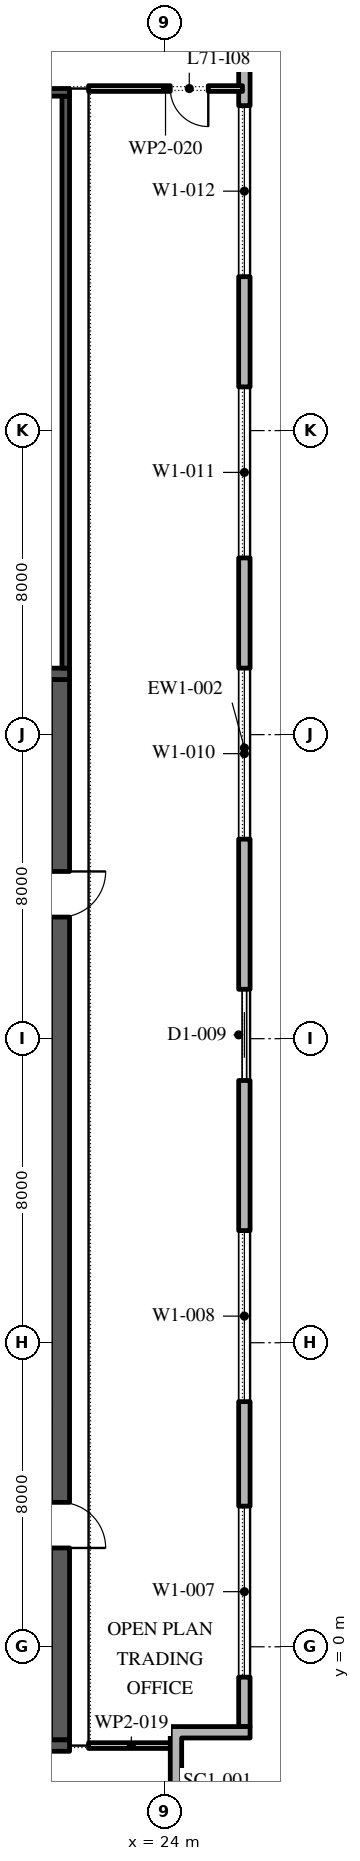
"""IFC4 building model, lengths in metres.
Left out: names, types, materials, properties, quantities, classifications, styles, units other than length and angle.
Written with IfcOpenShell. Run it as: python <this file> out.ifc"""

import sys

from ifc_helpers import new_model, si_unit, direction, frame, frame_2d, origin, place, context, subcontext, project, spatial, polyline, rectangle, outline, extrude, element, fill, save


model = new_model("IFC4")
c1 = context("Model", 3, precision=1e-05, world=origin(), true_north=direction((0.0, 1.0)))
c2 = subcontext(c1, "Body", "Model", "MODEL_VIEW")
j1 = project(units=[si_unit("LENGTHUNIT", "METRE"), si_unit("PLANEANGLEUNIT", "RADIAN")], contexts=[c1])
p1 = place(None, origin())
s1 = spatial("IfcSite", under=j1, at=p1, CompositionType="ELEMENT")
p2 = place(p1, origin())
s2 = spatial("IfcBuilding", under=s1, at=p2, CompositionType="ELEMENT")
p3 = place(p2, frame((0.0, 0.0, 325.8)))
s3 = spatial("IfcBuildingStorey", under=s2, at=p3, CompositionType="ELEMENT", Elevation=325.8)
p4 = place(p3, frame((26.1, -2.1, 0.0), z_axis=(0.0, 0.0, 1.0), x_axis=(0.0, 1.0, 0.0)))
e1 = element("IfcWall", 1, at=p4, inside=s3, PredefinedType="STANDARD", context=c2, shape_type="SweptSolid", body=[
    extrude(rectangle(XDim=51.5, YDim=0.3, at=frame_2d((25.75, 0.0))), origin(), (0.0, 0.0, 1.0), 4.0),
])
p5 = place(p4, frame((1.3, 0.0, 0.45)))
e2 = element("IfcOpeningElement", 2, at=p5, cuts=e1, PredefinedType="OPENING", context=c2, shape_type="SweptSolid", body=[
    extrude(rectangle(XDim=4.5, YDim=3.05, at=frame_2d((2.25, 1.525))), frame((0.0, 0.16, 0.0), z_axis=(0.0, -1.0, 0.0), x_axis=(1.0, 0.0, 0.0)), (0.0, 0.0, 1.0), 0.32),
])
p6 = place(p4, frame((8.55, 0.0, 0.45)))
e3 = element("IfcOpeningElement", 3, at=p6, cuts=e1, PredefinedType="OPENING", context=c2, shape_type="SweptSolid", body=[
    extrude(rectangle(XDim=4.5, YDim=3.05, at=frame_2d((2.25, 1.525))), frame((0.0, 0.16, 0.0), z_axis=(0.0, -1.0, 0.0), x_axis=(1.0, 0.0, 0.0)), (0.0, 0.0, 1.0), 0.32),
])
p7 = place(p4, frame((17.0, 0.0, 0.0)))
e4 = element("IfcOpeningElement", 4, at=p7, cuts=e1, PredefinedType="OPENING", context=c2, shape_type="SweptSolid", body=[
    extrude(rectangle(XDim=2.4, YDim=3.5, at=frame_2d((1.2, 1.75))), frame((0.0, 0.16, 0.0), z_axis=(0.0, -1.0, 0.0), x_axis=(1.0, 0.0, 0.0)), (0.0, 0.0, 1.0), 0.32),
])
p8 = place(p4, frame((23.35, 0.0, 0.45)))
e5 = element("IfcOpeningElement", 5, at=p8, cuts=e1, PredefinedType="OPENING", context=c2, shape_type="SweptSolid", body=[
    extrude(rectangle(XDim=4.5, YDim=3.05, at=frame_2d((2.25, 1.525))), frame((0.0, 0.16, 0.0), z_axis=(0.0, -1.0, 0.0), x_axis=(1.0, 0.0, 0.0)), (0.0, 0.0, 1.0), 0.32),
])
p9 = place(p4, frame((30.75, 0.0, 0.45)))
e6 = element("IfcOpeningElement", 6, at=p9, cuts=e1, PredefinedType="OPENING", context=c2, shape_type="SweptSolid", body=[
    extrude(rectangle(XDim=4.5, YDim=3.05, at=frame_2d((2.25, 1.525))), frame((0.0, 0.16, 0.0), z_axis=(0.0, -1.0, 0.0), x_axis=(1.0, 0.0, 0.0)), (0.0, 0.0, 1.0), 0.32),
])
p10 = place(p4, frame((38.15, 0.0, 0.45)))
e7 = element("IfcOpeningElement", 7, at=p10, cuts=e1, PredefinedType="OPENING", context=c2, shape_type="SweptSolid", body=[
    extrude(rectangle(XDim=4.5, YDim=3.05, at=frame_2d((2.25, 1.525))), frame((0.0, 0.16, 0.0), z_axis=(0.0, -1.0, 0.0), x_axis=(1.0, 0.0, 0.0)), (0.0, 0.0, 1.0), 0.32),
])
p11 = place(p4, frame((46.6, 0.0, 0.0)))
e8 = element("IfcOpeningElement", 8, at=p11, cuts=e1, PredefinedType="OPENING", context=c2, shape_type="SweptSolid", body=[
    extrude(rectangle(XDim=2.4, YDim=3.5, at=frame_2d((1.2, 1.75))), frame((0.0, 0.16, 0.0), z_axis=(0.0, -1.0, 0.0), x_axis=(1.0, 0.0, 0.0)), (0.0, 0.0, 1.0), 0.32),
])
p12 = place(p3, origin())
e9 = element("IfcWall", 9, at=p12, inside=s3, PredefinedType="STANDARD", context=c2, shape_type="SweptSolid", body=[
    extrude(outline(polyline([(24.15, -3.9), (24.15, -2.1), (26.25, -2.1), (26.25, -2.4), (24.45, -2.4), (24.45, -4.2), (22.65, -4.2), (22.65, -5.7), (22.35, -5.7), (22.35, -3.9), (24.15, -3.9)])), origin(), (0.0, 0.0, 1.0), 4.0),
])
p13 = place(p3, frame((21.25, -2.45, 0.0), z_axis=(0.0, 0.0, 1.0), x_axis=(0.0, 1.0, 0.0)))
e10 = element("IfcWall", 10, at=p13, inside=s3, PredefinedType="SHEAR", context=c2, shape_type="SweptSolid", body=[
    extrude(rectangle(XDim=27.9, YDim=0.5, at=frame_2d((13.95, 0.0))), origin(), (0.0, 0.0, 1.0), 4.0),
])
p14 = place(p13, frame((5.05, 0.0, 0.0)))
e11 = element("IfcOpeningElement", 11, at=p14, cuts=e10, PredefinedType="OPENING", context=c2, shape_type="SweptSolid", body=[
    extrude(rectangle(XDim=1.2, YDim=2.1, at=frame_2d((0.6, 1.05))), frame((0.0, 0.26, 0.0), z_axis=(0.0, -1.0, 0.0), x_axis=(1.0, 0.0, 0.0)), (0.0, 0.0, 1.0), 0.52),
])
p15 = place(p13, frame((21.65, 0.0, 0.0)))
e12 = element("IfcOpeningElement", 12, at=p15, cuts=e10, PredefinedType="OPENING", context=c2, shape_type="SweptSolid", body=[
    extrude(rectangle(XDim=1.2, YDim=2.1, at=frame_2d((0.6, 1.05))), frame((0.0, 0.26, 0.0), z_axis=(0.0, -1.0, 0.0), x_axis=(1.0, 0.0, 0.0)), (0.0, 0.0, 1.0), 0.52),
])
for number, where, z_axis, x_axis in (
    (13, (10.5, -2.6, 0.0), (0.0, 0.0, 1.0), (1.0, 0.0, 0.0)),
    (14, (10.5, 25.6, 0.0), (0.0, 0.0, 1.0), (1.0, 0.0, 0.0)),
):
    element("IfcWall", number, at=place(p3, frame(where, z_axis=z_axis, x_axis=x_axis)), inside=s3, PredefinedType="SHEAR", context=c2, shape_type="SweptSolid", body=[
        extrude(rectangle(XDim=11.0, YDim=0.3, at=frame_2d((5.5, 0.0))), origin(), (0.0, 0.0, 1.0), 4.0),
    ])
p16 = place(p3, frame((21.4, 25.75, 0.0), z_axis=(0.0, 0.0, 1.0), x_axis=(0.0, 1.0, 0.0)))
e15 = element("IfcWall", 15, at=p16, inside=s3, PredefinedType="SHEAR", context=c2, shape_type="SweptSolid", body=[
    extrude(rectangle(XDim=15.05, YDim=0.2, at=frame_2d((7.525, 0.0))), origin(), (0.0, 0.0, 1.0), 4.0),
])
p17 = place(p3, frame((10.5, 40.9, 0.0), z_axis=(0.0, 0.0, 1.0), x_axis=(1.0, 0.0, 0.0)))
e16 = element("IfcWall", 16, at=p17, inside=s3, PredefinedType="SHEAR", context=c2, shape_type="SweptSolid", body=[
    extrude(rectangle(XDim=11.0, YDim=0.2, at=frame_2d((5.5, 0.0))), origin(), (0.0, 0.0, 1.0), 4.0),
])
p18 = place(p3, frame((22.0, -2.6, 0.0), z_axis=(0.0, 0.0, 1.0), x_axis=(1.0, 0.0, 0.0)))
e17 = element("IfcWall", 17, at=p18, inside=s3, PredefinedType="PARTITIONING", context=c2, shape_type="SweptSolid", body=[
    extrude(rectangle(XDim=2.25, YDim=0.15, at=frame_2d((1.125, 0.0))), origin(), (0.0, 0.0, 1.0), 4.0),
])
p19 = place(p3, frame((26.05, 41.0, 0.0), z_axis=(0.0, 0.0, 1.0), x_axis=(-1.0, 0.0, 0.0)))
e18 = element("IfcWall", 18, at=p19, inside=s3, PredefinedType="PARTITIONING", context=c2, shape_type="SweptSolid", body=[
    extrude(rectangle(XDim=4.05, YDim=0.15, at=frame_2d((2.025, 0.0))), origin(), (0.0, 0.0, 1.0), 4.0),
])
p20 = place(p19, frame((0.9, 0.0, 0.0)))
e19 = element("IfcOpeningElement", 19, at=p20, cuts=e18, PredefinedType="OPENING", context=c2, shape_type="SweptSolid", body=[
    extrude(rectangle(XDim=1.0, YDim=2.1, at=frame_2d((0.5, 1.05))), frame((0.0, 0.085, 0.0), z_axis=(0.0, -1.0, 0.0), x_axis=(1.0, 0.0, 0.0)), (0.0, 0.0, 1.0), 0.17),
])
p21 = place(p5, origin())
e20 = element("IfcWindow", 20, at=p21, inside=s3, PartitioningType="DOUBLE_PANEL_VERTICAL", PredefinedType="WINDOW", context=c2, shape_type="SweptSolid", body=[
    extrude(rectangle(XDim=4.5, YDim=3.05, at=frame_2d((2.25, 1.525))), frame((0.0, 0.03, 0.0), z_axis=(0.0, -1.0, 0.0), x_axis=(1.0, 0.0, 0.0)), (0.0, 0.0, 1.0), 0.06),
])
fill(e2, e20)
p22 = place(p6, origin())
e21 = element("IfcWindow", 21, at=p22, inside=s3, PartitioningType="DOUBLE_PANEL_VERTICAL", PredefinedType="WINDOW", context=c2, shape_type="SweptSolid", body=[
    extrude(rectangle(XDim=4.5, YDim=3.05, at=frame_2d((2.25, 1.525))), frame((0.0, 0.03, 0.0), z_axis=(0.0, -1.0, 0.0), x_axis=(1.0, 0.0, 0.0)), (0.0, 0.0, 1.0), 0.06),
])
fill(e3, e21)
p23 = place(p7, origin())
e22 = element("IfcDoor", 22, at=p23, inside=s3, OperationType="DOUBLE_DOOR_SLIDING", PredefinedType="DOOR", context=c2, shape_type="SweptSolid", body=[
    extrude(rectangle(XDim=2.4, YDim=3.5, at=frame_2d((1.2, 1.75))), frame((0.0, 0.025, 0.0), z_axis=(0.0, -1.0, 0.0), x_axis=(1.0, 0.0, 0.0)), (0.0, 0.0, 1.0), 0.05),
])
fill(e4, e22)
p24 = place(p8, origin())
e23 = element("IfcWindow", 23, at=p24, inside=s3, PartitioningType="DOUBLE_PANEL_VERTICAL", PredefinedType="WINDOW", context=c2, shape_type="SweptSolid", body=[
    extrude(rectangle(XDim=4.5, YDim=3.05, at=frame_2d((2.25, 1.525))), frame((0.0, 0.03, 0.0), z_axis=(0.0, -1.0, 0.0), x_axis=(1.0, 0.0, 0.0)), (0.0, 0.0, 1.0), 0.06),
])
fill(e5, e23)
p25 = place(p9, origin())
e24 = element("IfcWindow", 24, at=p25, inside=s3, PartitioningType="DOUBLE_PANEL_VERTICAL", PredefinedType="WINDOW", context=c2, shape_type="SweptSolid", body=[
    extrude(rectangle(XDim=4.5, YDim=3.05, at=frame_2d((2.25, 1.525))), frame((0.0, 0.03, 0.0), z_axis=(0.0, -1.0, 0.0), x_axis=(1.0, 0.0, 0.0)), (0.0, 0.0, 1.0), 0.06),
])
fill(e6, e24)
p26 = place(p10, origin())
e25 = element("IfcWindow", 25, at=p26, inside=s3, PartitioningType="DOUBLE_PANEL_VERTICAL", PredefinedType="WINDOW", context=c2, shape_type="SweptSolid", body=[
    extrude(rectangle(XDim=4.5, YDim=3.05, at=frame_2d((2.25, 1.525))), frame((0.0, 0.03, 0.0), z_axis=(0.0, -1.0, 0.0), x_axis=(1.0, 0.0, 0.0)), (0.0, 0.0, 1.0), 0.06),
])
fill(e7, e25)
p27 = place(p14, frame((1.2, 0.0, 0.0), z_axis=(0.0, 0.0, 1.0), x_axis=(-1.0, 0.0, 0.0)))
e26 = element("IfcDoor", 26, at=p27, inside=s3, OperationType="SINGLE_SWING_LEFT", PredefinedType="DOOR", context=c2, shape_type="SweptSolid", body=[
    extrude(rectangle(XDim=1.2, YDim=2.1, at=frame_2d((0.6, 1.05))), frame((0.0, 0.025, 0.0), z_axis=(0.0, -1.0, 0.0), x_axis=(1.0, 0.0, 0.0)), (0.0, 0.0, 1.0), 0.05),
])
fill(e11, e26)
p28 = place(p15, frame((1.2, 0.0, 0.0), z_axis=(0.0, 0.0, 1.0), x_axis=(-1.0, 0.0, 0.0)))
e27 = element("IfcDoor", 27, at=p28, inside=s3, OperationType="SINGLE_SWING_RIGHT", PredefinedType="DOOR", context=c2, shape_type="SweptSolid", body=[
    extrude(rectangle(XDim=1.2, YDim=2.1, at=frame_2d((0.6, 1.05))), frame((0.0, 0.025, 0.0), z_axis=(0.0, -1.0, 0.0), x_axis=(1.0, 0.0, 0.0)), (0.0, 0.0, 1.0), 0.05),
])
fill(e12, e27)
p29 = place(p20, origin())
e28 = element("IfcDoor", 28, at=p29, inside=s3, OperationType="SINGLE_SWING_RIGHT", PredefinedType="DOOR", context=c2, shape_type="SweptSolid", body=[
    extrude(rectangle(XDim=1.0, YDim=2.1, at=frame_2d((0.5, 1.05))), frame((0.0, 0.025, 0.0), z_axis=(0.0, -1.0, 0.0), x_axis=(1.0, 0.0, 0.0)), (0.0, 0.0, 1.0), 0.05),
])
fill(e19, e28)
save(model, sys.argv[1])
